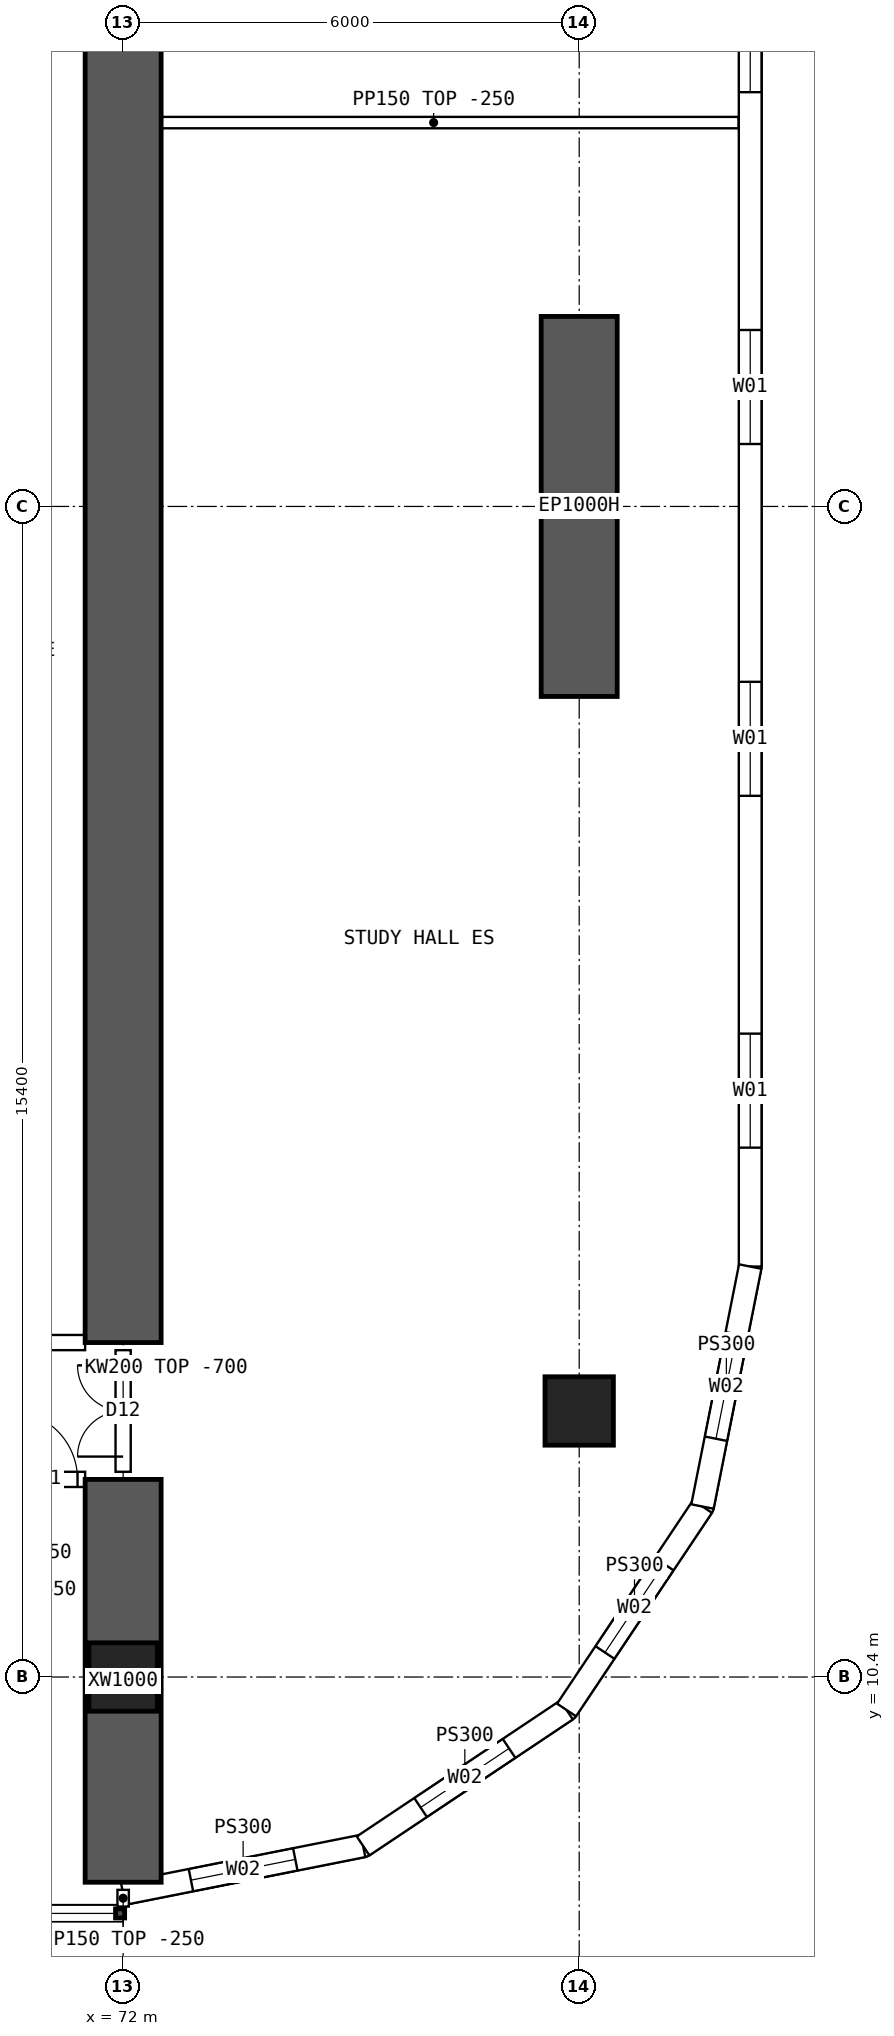
"""IFC4 building model, lengths in metres.
Left out: names, types, materials, properties, quantities, classifications, styles, units other than length and angle.
Written with IfcOpenShell. Run it as: python <this file> out.ifc"""

import sys

from ifc_helpers import new_model, si_unit, direction, frame, frame_2d, origin, origin_2d, place, context, subcontext, project, spatial, polyline, rectangle, hollow_rectangle, outline, extrude, element, fill, save


model = new_model("IFC4")
c1 = context("Model", 3, precision=1e-05, world=origin(), true_north=direction((0.0, 1.0)))
c2 = subcontext(c1, "Body", "Model", "MODEL_VIEW")
j1 = project(units=[si_unit("LENGTHUNIT", "METRE"), si_unit("PLANEANGLEUNIT", "RADIAN")], contexts=[c1])
p1 = place(None, origin())
s1 = spatial("IfcSite", under=j1, at=p1, CompositionType="ELEMENT")
p2 = place(p1, origin())
s2 = spatial("IfcBuilding", under=s1, at=p2, CompositionType="ELEMENT")
p3 = place(p2, frame((0.0, 0.0, 31.45)))
s3 = spatial("IfcBuildingStorey", under=s2, at=p3, CompositionType="ELEMENT", Elevation=31.45)
for number, where, z_axis, x_axis in (
    (1, (72.0, 10.4, 0.0), (0.0, 0.0, 1.0), (1.0, 0.0, 0.0)),
    (2, (78.0, 13.9, 0.0), (0.0, 0.0, 1.0), (1.0, 0.0, 0.0)),
):
    element("IfcColumn", number, at=place(p3, frame(where, z_axis=z_axis, x_axis=x_axis)), inside=s3, PredefinedType="COLUMN", context=c2, shape_type="SweptSolid", body=[
        extrude(hollow_rectangle(XDim=0.9, YDim=0.9, WallThickness=0.09, at=origin_2d()), origin(), (0.0, 0.0, 1.0), 3.75),
    ])
p4 = place(p3, frame((78.0, 23.3, 0.0), z_axis=(0.0, 0.0, 1.0), x_axis=(0.0, 1.0, 0.0)))
e3 = element("IfcWall", 3, at=p4, inside=s3, PredefinedType="SHEAR", context=c2, shape_type="SweptSolid", body=[
    extrude(rectangle(XDim=5.0, YDim=1.0, at=frame_2d((2.5, 0.0))), origin(), (0.0, 0.0, 1.0), 3.75),
])
p5 = place(p3, frame((72.0, 7.7, 0.0), z_axis=(0.0, 0.0, 1.0), x_axis=(0.0, 1.0, 0.0)))
e4 = element("IfcWall", 4, at=p5, inside=s3, PredefinedType="SHEAR", context=c2, shape_type="SweptSolid", body=[
    extrude(rectangle(XDim=5.3, YDim=1.0, at=frame_2d((2.65, 0.0))), origin(), (0.0, 0.0, 1.0), 3.75),
])
p6 = place(p3, frame((72.0, 14.8, 0.0), z_axis=(0.0, 0.0, 1.0), x_axis=(0.0, 1.0, 0.0)))
e5 = element("IfcWall", 5, at=p6, inside=s3, PredefinedType="SHEAR", context=c2, shape_type="SweptSolid", body=[
    extrude(rectangle(XDim=34.4, YDim=1.0, at=frame_2d((17.2, 0.0))), origin(), (0.0, 0.0, 1.0), 3.75),
])
p7 = place(p3, frame((80.25, 15.8, 0.0), z_axis=(0.0, 0.0, 1.0), x_axis=(0.0, 1.0, 0.0)))
e6 = element("IfcWall", 6, at=p7, inside=s3, PredefinedType="SOLIDWALL", context=c2, shape_type="SweptSolid", body=[
    extrude(outline(polyline([(-0.015, -0.15), (32.415, -0.15), (32.385, 0.15), (0.015, 0.15), (-0.015, -0.15)])), origin(), (0.0, 0.0, 1.0), 3.5),
])
p8 = place(p7, frame((1.564, 0.0, 0.9)))
e7 = element("IfcOpeningElement", 7, at=p8, cuts=e6, PredefinedType="OPENING", context=c2, shape_type="SweptSolid", body=[
    extrude(rectangle(XDim=1.5, YDim=2.0, at=frame_2d((0.75, 1.0))), frame((0.0, 0.16, 0.0), z_axis=(0.0, -1.0, 0.0), x_axis=(1.0, 0.0, 0.0)), (0.0, 0.0, 1.0), 0.32),
])
p9 = place(p7, frame((6.193, 0.0, 0.9)))
e8 = element("IfcOpeningElement", 8, at=p9, cuts=e6, PredefinedType="OPENING", context=c2, shape_type="SweptSolid", body=[
    extrude(rectangle(XDim=1.5, YDim=2.0, at=frame_2d((0.75, 1.0))), frame((0.0, 0.16, 0.0), z_axis=(0.0, -1.0, 0.0), x_axis=(1.0, 0.0, 0.0)), (0.0, 0.0, 1.0), 0.32),
])
p10 = place(p7, frame((10.822, 0.0, 0.9)))
e9 = element("IfcOpeningElement", 9, at=p10, cuts=e6, PredefinedType="OPENING", context=c2, shape_type="SweptSolid", body=[
    extrude(rectangle(XDim=1.5, YDim=2.0, at=frame_2d((0.75, 1.0))), frame((0.0, 0.16, 0.0), z_axis=(0.0, -1.0, 0.0), x_axis=(1.0, 0.0, 0.0)), (0.0, 0.0, 1.0), 0.32),
])
p11 = place(p7, frame((15.45, 0.0, 0.9)))
e10 = element("IfcOpeningElement", 10, at=p11, cuts=e6, PredefinedType="OPENING", context=c2, shape_type="SweptSolid", body=[
    extrude(rectangle(XDim=1.5, YDim=2.0, at=frame_2d((0.75, 1.0))), frame((0.0, 0.16, 0.0), z_axis=(0.0, -1.0, 0.0), x_axis=(1.0, 0.0, 0.0)), (0.0, 0.0, 1.0), 0.32),
])
p12 = place(p7, frame((20.079, 0.0, 0.9)))
e11 = element("IfcOpeningElement", 11, at=p12, cuts=e6, PredefinedType="OPENING", context=c2, shape_type="SweptSolid", body=[
    extrude(rectangle(XDim=1.5, YDim=2.0, at=frame_2d((0.75, 1.0))), frame((0.0, 0.16, 0.0), z_axis=(0.0, -1.0, 0.0), x_axis=(1.0, 0.0, 0.0)), (0.0, 0.0, 1.0), 0.32),
])
p13 = place(p7, frame((24.707, 0.0, 0.9)))
e12 = element("IfcOpeningElement", 12, at=p13, cuts=e6, PredefinedType="OPENING", context=c2, shape_type="SweptSolid", body=[
    extrude(rectangle(XDim=1.5, YDim=2.0, at=frame_2d((0.75, 1.0))), frame((0.0, 0.16, 0.0), z_axis=(0.0, -1.0, 0.0), x_axis=(1.0, 0.0, 0.0)), (0.0, 0.0, 1.0), 0.32),
])
p14 = place(p7, frame((29.336, 0.0, 0.9)))
e13 = element("IfcOpeningElement", 13, at=p14, cuts=e6, PredefinedType="OPENING", context=c2, shape_type="SweptSolid", body=[
    extrude(rectangle(XDim=1.5, YDim=2.0, at=frame_2d((0.75, 1.0))), frame((0.0, 0.16, 0.0), z_axis=(0.0, -1.0, 0.0), x_axis=(1.0, 0.0, 0.0)), (0.0, 0.0, 1.0), 0.32),
])
p15 = place(p3, frame((72.0, 7.55, 0.0), z_axis=(0.0, 0.0, 1.0), x_axis=(0.980787251524, 0.195080412259, 0.0)))
e14 = element("IfcWall", 14, at=p15, inside=s3, PredefinedType="SOLIDWALL", context=c2, shape_type="SweptSolid", body=[
    extrude(outline(polyline([(-0.03, -0.15), (3.249, -0.15), (3.189, 0.15), (0.03, 0.15), (-0.03, -0.15)])), origin(), (0.0, 0.0, 1.0), 3.5),
])
p16 = place(p15, frame((0.909, 0.0, 0.9)))
e15 = element("IfcOpeningElement", 15, at=p16, cuts=e14, PredefinedType="OPENING", context=c2, shape_type="SweptSolid", body=[
    extrude(rectangle(XDim=1.4, YDim=1.8, at=frame_2d((0.7, 0.9))), frame((0.0, 0.16, 0.0), z_axis=(0.0, -1.0, 0.0), x_axis=(1.0, 0.0, 0.0)), (0.0, 0.0, 1.0), 0.32),
])
p17 = place(p3, frame((75.157, 8.178, 0.0), z_axis=(0.0, 0.0, 1.0), x_axis=(0.831478105043, 0.555557522525, 0.0)))
e16 = element("IfcWall", 16, at=p17, inside=s3, PredefinedType="SOLIDWALL", context=c2, shape_type="SweptSolid", body=[
    extrude(outline(polyline([(-0.03, -0.15), (3.249, -0.15), (3.189, 0.15), (0.03, 0.15), (-0.03, -0.15)])), origin(), (0.0, 0.0, 1.0), 3.5),
])
p18 = place(p17, frame((0.909, 0.0, 0.9)))
e17 = element("IfcOpeningElement", 17, at=p18, cuts=e16, PredefinedType="OPENING", context=c2, shape_type="SweptSolid", body=[
    extrude(rectangle(XDim=1.4, YDim=1.8, at=frame_2d((0.7, 0.9))), frame((0.0, 0.16, 0.0), z_axis=(0.0, -1.0, 0.0), x_axis=(1.0, 0.0, 0.0)), (0.0, 0.0, 1.0), 0.32),
])
p19 = place(p3, frame((77.833, 9.966, 0.0), z_axis=(0.0, 0.0, 1.0), x_axis=(0.555609954424, 0.831443069936, 0.0)))
e18 = element("IfcWall", 18, at=p19, inside=s3, PredefinedType="SOLIDWALL", context=c2, shape_type="SweptSolid", body=[
    extrude(outline(polyline([(-0.03, -0.15), (3.249, -0.15), (3.189, 0.15), (0.03, 0.15), (-0.03, -0.15)])), origin(), (0.0, 0.0, 1.0), 3.5),
])
p20 = place(p19, frame((0.909, 0.0, 0.9)))
e19 = element("IfcOpeningElement", 19, at=p20, cuts=e18, PredefinedType="OPENING", context=c2, shape_type="SweptSolid", body=[
    extrude(rectangle(XDim=1.4, YDim=1.8, at=frame_2d((0.7, 0.9))), frame((0.0, 0.16, 0.0), z_axis=(0.0, -1.0, 0.0), x_axis=(1.0, 0.0, 0.0)), (0.0, 0.0, 1.0), 0.32),
])
p21 = place(p3, frame((79.622, 12.643, 0.0), z_axis=(0.0, 0.0, 1.0), x_axis=(0.195065901187, 0.980790137692, 0.0)))
e20 = element("IfcWall", 20, at=p21, inside=s3, PredefinedType="SOLIDWALL", context=c2, shape_type="SweptSolid", body=[
    extrude(outline(polyline([(-0.03, -0.15), (3.234, -0.15), (3.204, 0.15), (0.03, 0.15), (-0.03, -0.15)])), origin(), (0.0, 0.0, 1.0), 3.5),
])
p22 = place(p21, frame((0.909, 0.0, 0.9)))
e21 = element("IfcOpeningElement", 21, at=p22, cuts=e20, PredefinedType="OPENING", context=c2, shape_type="SweptSolid", body=[
    extrude(rectangle(XDim=1.4, YDim=1.8, at=frame_2d((0.7, 0.9))), frame((0.0, 0.16, 0.0), z_axis=(0.0, -1.0, 0.0), x_axis=(1.0, 0.0, 0.0)), (0.0, 0.0, 1.0), 0.32),
])
p23 = place(p3, frame((66.5, 13.0, 0.0), z_axis=(0.0, 0.0, 1.0), x_axis=(1.0, 0.0, 0.0)))
e22 = element("IfcWall", 22, at=p23, inside=s3, PredefinedType="SOLIDWALL", context=c2, shape_type="SweptSolid", body=[
    extrude(outline(polyline([(0.0, 0.0), (5.0, 0.0), (5.0, 3.1), (0.0, 3.1), (0.0, 0.0)])), frame((0.0, 0.1, 0.0), z_axis=(0.0, -1.0, 0.0), x_axis=(1.0, 0.0, 0.0)), (0.0, 0.0, 1.0), 0.2),
])
p24 = place(p23, frame((0.1, 0.0, 0.0)))
e23 = element("IfcOpeningElement", 23, at=p24, cuts=e22, PredefinedType="OPENING", context=c2, shape_type="SweptSolid", body=[
    extrude(rectangle(XDim=0.9, YDim=2.1, at=frame_2d((0.45, 1.05))), frame((0.0, 0.11, 0.0), z_axis=(0.0, -1.0, 0.0), x_axis=(1.0, 0.0, 0.0)), (0.0, 0.0, 1.0), 0.22),
])
p25 = place(p23, frame((4.0, 0.0, 0.0)))
e24 = element("IfcOpeningElement", 24, at=p25, cuts=e22, PredefinedType="OPENING", context=c2, shape_type="SweptSolid", body=[
    extrude(rectangle(XDim=0.9, YDim=2.1, at=frame_2d((0.45, 1.05))), frame((0.0, 0.11, 0.0), z_axis=(0.0, -1.0, 0.0), x_axis=(1.0, 0.0, 0.0)), (0.0, 0.0, 1.0), 0.22),
])
p26 = place(p3, frame((66.5, 14.8, 0.0), z_axis=(0.0, 0.0, 1.0), x_axis=(1.0, 0.0, 0.0)))
e25 = element("IfcWall", 25, at=p26, inside=s3, PredefinedType="SOLIDWALL", context=c2, shape_type="SweptSolid", body=[
    extrude(rectangle(XDim=5.0, YDim=0.2, at=frame_2d((2.5, 0.0))), origin(), (0.0, 0.0, 1.0), 3.5),
])
p27 = place(p26, frame((0.2, 0.0, 0.0)))
e26 = element("IfcOpeningElement", 26, at=p27, cuts=e25, PredefinedType="OPENING", context=c2, shape_type="SweptSolid", body=[
    extrude(rectangle(XDim=1.6, YDim=2.1, at=frame_2d((0.8, 1.05))), frame((0.0, 0.11, 0.0), z_axis=(0.0, -1.0, 0.0), x_axis=(1.0, 0.0, 0.0)), (0.0, 0.0, 1.0), 0.22),
])
p28 = place(p3, frame((72.075, 30.85, 0.0), z_axis=(0.0, 0.0, 1.0), x_axis=(1.0, 0.0, 0.0)))
e27 = element("IfcWall", 27, at=p28, inside=s3, PredefinedType="PARTITIONING", context=c2, shape_type="SweptSolid", body=[
    extrude(outline(polyline([(0.0, 0.0), (8.02, 0.0), (8.02, 3.5), (6.227, 3.5), (6.225, 3.05), (5.627, 3.05), (5.625, 3.5), (0.0, 3.5), (0.0, 0.0)])), frame((0.0, 0.075, 0.0), z_axis=(0.0, -1.0, 0.0), x_axis=(1.0, 0.0, 0.0)), (0.0, 0.0, 1.0), 0.15),
])
p29 = place(p3, frame((72.0, 13.1, 0.0), z_axis=(0.0, 0.0, 1.0), x_axis=(0.0, 1.0, 0.0)))
e28 = element("IfcWall", 28, at=p29, inside=s3, PredefinedType="SOLIDWALL", context=c2, shape_type="SweptSolid", body=[
    extrude(outline(polyline([(0.0, 0.0), (1.6, 0.0), (1.6, 3.05), (0.0, 3.05), (0.0, 0.0)])), frame((0.0, 0.1, 0.0), z_axis=(0.0, -1.0, 0.0), x_axis=(1.0, 0.0, 0.0)), (0.0, 0.0, 1.0), 0.2),
])
p30 = place(p29, frame((0.2, 0.0, 0.0)))
e29 = element("IfcOpeningElement", 29, at=p30, cuts=e28, PredefinedType="OPENING", context=c2, shape_type="SweptSolid", body=[
    extrude(rectangle(XDim=1.2, YDim=2.1, at=frame_2d((0.6, 1.05))), frame((0.0, 0.11, 0.0), z_axis=(0.0, -1.0, 0.0), x_axis=(1.0, 0.0, 0.0)), (0.0, 0.0, 1.0), 0.22),
])
p31 = place(p3, frame((72.0, 7.6, 0.0), z_axis=(0.0, 0.0, 1.0), x_axis=(0.0, -1.0, 0.0)))
e30 = element("IfcWall", 30, at=p31, inside=s3, PredefinedType="PARTITIONING", context=c2, shape_type="SweptSolid", body=[
    extrude(rectangle(XDim=0.22, YDim=0.15, at=frame_2d((0.11, 0.0))), origin(), (0.0, 0.0, 1.0), 3.5),
])
p32 = place(p8, origin())
e31 = element("IfcWindow", 31, at=p32, inside=s3, PartitioningType="SINGLE_PANEL", PredefinedType="WINDOW", context=c2, shape_type="SweptSolid", body=[
    extrude(rectangle(XDim=1.5, YDim=2.0, at=frame_2d((0.75, 1.0))), frame((0.0, 0.03, 0.0), z_axis=(0.0, -1.0, 0.0), x_axis=(1.0, 0.0, 0.0)), (0.0, 0.0, 1.0), 0.06),
])
fill(e7, e31)
p33 = place(p9, origin())
e32 = element("IfcWindow", 32, at=p33, inside=s3, PartitioningType="SINGLE_PANEL", PredefinedType="WINDOW", context=c2, shape_type="SweptSolid", body=[
    extrude(rectangle(XDim=1.5, YDim=2.0, at=frame_2d((0.75, 1.0))), frame((0.0, 0.03, 0.0), z_axis=(0.0, -1.0, 0.0), x_axis=(1.0, 0.0, 0.0)), (0.0, 0.0, 1.0), 0.06),
])
fill(e8, e32)
p34 = place(p10, origin())
e33 = element("IfcWindow", 33, at=p34, inside=s3, PartitioningType="SINGLE_PANEL", PredefinedType="WINDOW", context=c2, shape_type="SweptSolid", body=[
    extrude(rectangle(XDim=1.5, YDim=2.0, at=frame_2d((0.75, 1.0))), frame((0.0, 0.03, 0.0), z_axis=(0.0, -1.0, 0.0), x_axis=(1.0, 0.0, 0.0)), (0.0, 0.0, 1.0), 0.06),
])
fill(e9, e33)
p35 = place(p11, origin())
e34 = element("IfcWindow", 34, at=p35, inside=s3, PartitioningType="SINGLE_PANEL", PredefinedType="WINDOW", context=c2, shape_type="SweptSolid", body=[
    extrude(rectangle(XDim=1.5, YDim=2.0, at=frame_2d((0.75, 1.0))), frame((0.0, 0.03, 0.0), z_axis=(0.0, -1.0, 0.0), x_axis=(1.0, 0.0, 0.0)), (0.0, 0.0, 1.0), 0.06),
])
fill(e10, e34)
p36 = place(p16, origin())
e35 = element("IfcWindow", 35, at=p36, inside=s3, PartitioningType="SINGLE_PANEL", PredefinedType="WINDOW", context=c2, shape_type="SweptSolid", body=[
    extrude(rectangle(XDim=1.4, YDim=1.8, at=frame_2d((0.7, 0.9))), frame((0.0, 0.03, 0.0), z_axis=(0.0, -1.0, 0.0), x_axis=(1.0, 0.0, 0.0)), (0.0, 0.0, 1.0), 0.06),
])
fill(e15, e35)
p37 = place(p18, origin())
e36 = element("IfcWindow", 36, at=p37, inside=s3, PartitioningType="SINGLE_PANEL", PredefinedType="WINDOW", context=c2, shape_type="SweptSolid", body=[
    extrude(rectangle(XDim=1.4, YDim=1.8, at=frame_2d((0.7, 0.9))), frame((0.0, 0.03, 0.0), z_axis=(0.0, -1.0, 0.0), x_axis=(1.0, 0.0, 0.0)), (0.0, 0.0, 1.0), 0.06),
])
fill(e17, e36)
p38 = place(p20, origin())
e37 = element("IfcWindow", 37, at=p38, inside=s3, PartitioningType="SINGLE_PANEL", PredefinedType="WINDOW", context=c2, shape_type="SweptSolid", body=[
    extrude(rectangle(XDim=1.4, YDim=1.8, at=frame_2d((0.7, 0.9))), frame((0.0, 0.03, 0.0), z_axis=(0.0, -1.0, 0.0), x_axis=(1.0, 0.0, 0.0)), (0.0, 0.0, 1.0), 0.06),
])
fill(e19, e37)
p39 = place(p22, origin())
e38 = element("IfcWindow", 38, at=p39, inside=s3, PartitioningType="SINGLE_PANEL", PredefinedType="WINDOW", context=c2, shape_type="SweptSolid", body=[
    extrude(rectangle(XDim=1.4, YDim=1.8, at=frame_2d((0.7, 0.9))), frame((0.0, 0.03, 0.0), z_axis=(0.0, -1.0, 0.0), x_axis=(1.0, 0.0, 0.0)), (0.0, 0.0, 1.0), 0.06),
])
fill(e21, e38)
p40 = place(p25, origin())
e39 = element("IfcDoor", 39, at=p40, inside=s3, OperationType="SINGLE_SWING_LEFT", PredefinedType="DOOR", context=c2, shape_type="SweptSolid", body=[
    extrude(rectangle(XDim=0.9, YDim=2.1, at=frame_2d((0.45, 1.05))), frame((0.0, 0.025, 0.0), z_axis=(0.0, -1.0, 0.0), x_axis=(1.0, 0.0, 0.0)), (0.0, 0.0, 1.0), 0.05),
])
fill(e24, e39)
p41 = place(p30, origin())
e40 = element("IfcDoor", 40, at=p41, inside=s3, OperationType="DOUBLE_DOOR_SINGLE_SWING", PredefinedType="DOOR", context=c2, shape_type="SweptSolid", body=[
    extrude(rectangle(XDim=1.2, YDim=2.1, at=frame_2d((0.6, 1.05))), frame((0.0, 0.025, 0.0), z_axis=(0.0, -1.0, 0.0), x_axis=(1.0, 0.0, 0.0)), (0.0, 0.0, 1.0), 0.05),
])
fill(e29, e40)
save(model, sys.argv[1])
